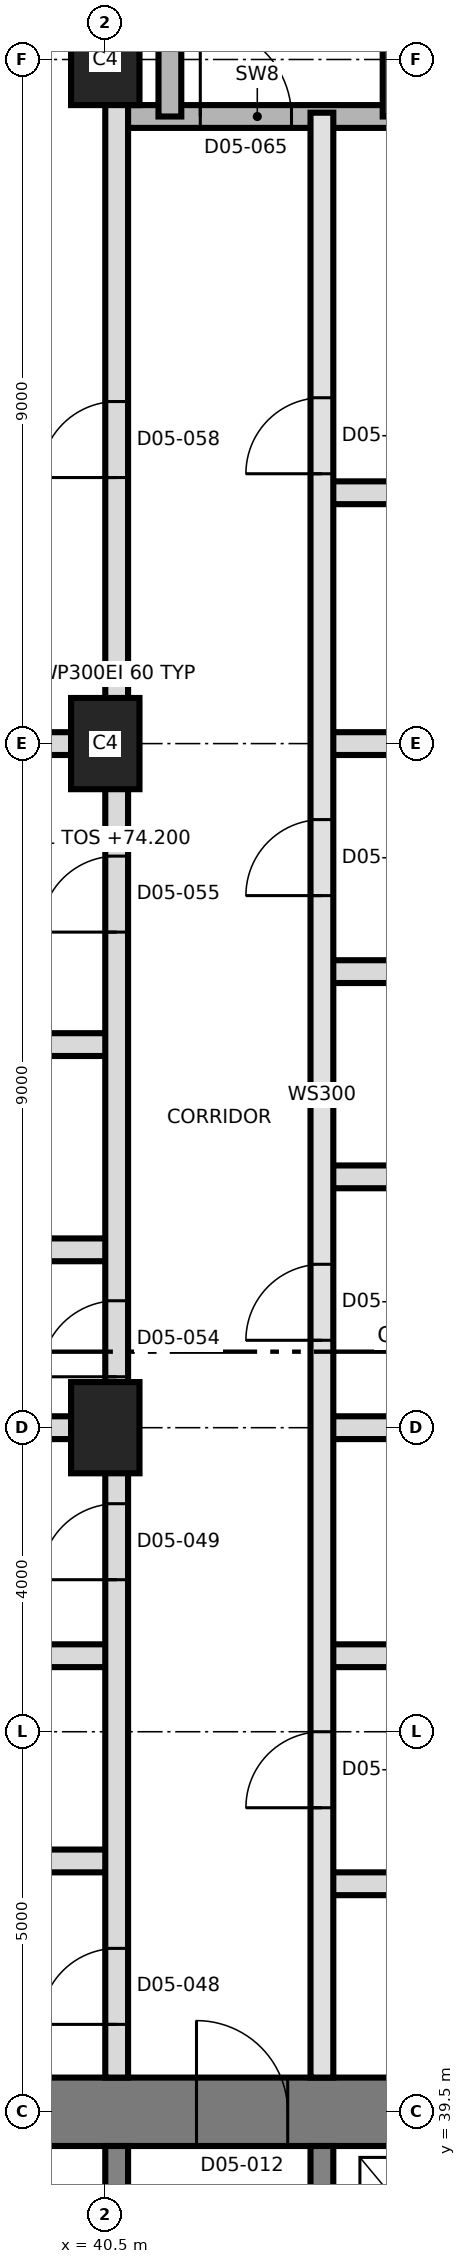
"""IFC4 building model, lengths in metres.
Left out: names, types, materials, properties, quantities, classifications, styles, units other than length and angle.
Written with IfcOpenShell. Run it as: python <this file> out.ifc"""

import sys

from ifc_helpers import new_model, si_unit, direction, frame, frame_2d, origin, origin_2d, place, context, subcontext, project, spatial, rectangle, extrude, element, fill, save


model = new_model("IFC4")
c1 = context("Model", 3, precision=1e-05, world=origin(), true_north=direction((0.0, 1.0)))
c2 = subcontext(c1, "Body", "Model", "MODEL_VIEW")
j1 = project(units=[si_unit("LENGTHUNIT", "METRE"), si_unit("PLANEANGLEUNIT", "RADIAN")], contexts=[c1])
p1 = place(None, origin())
s1 = spatial("IfcSite", under=j1, at=p1, CompositionType="ELEMENT")
p2 = place(p1, origin())
s2 = spatial("IfcBuilding", under=s1, at=p2, CompositionType="ELEMENT")
p3 = place(p2, frame((0.0, 0.0, 74.2)))
s3 = spatial("IfcBuildingStorey", under=s2, at=p3, CompositionType="ELEMENT", Elevation=74.2)
p4 = place(p3, frame((31.05, 39.5, 0.0), z_axis=(0.0, 0.0, 1.0), x_axis=(1.0, 0.0, 0.0)))
e1 = element("IfcWall", 1, at=p4, inside=s3, PredefinedType="SHEAR", context=c2, shape_type="SweptSolid", body=[
    extrude(rectangle(XDim=27.0, YDim=0.9, at=frame_2d((13.5, 0.0))), origin(), (0.0, 0.0, 1.0), 3.7),
])
p5 = place(p4, frame((10.65, 0.0, 0.0)))
e2 = element("IfcOpeningElement", 2, at=p5, cuts=e1, PredefinedType="OPENING", context=c2, shape_type="SweptSolid", body=[
    extrude(rectangle(XDim=1.2, YDim=2.1, at=frame_2d((0.6, 1.05))), frame((0.0, 0.46, 0.0), z_axis=(0.0, -1.0, 0.0), x_axis=(1.0, 0.0, 0.0)), (0.0, 0.0, 1.0), 0.92),
])
for number, where, z_axis, x_axis in (
    (3, (40.65, 33.5, 0.0), (0.0, 0.0, 1.0), (0.0, 1.0, 0.0)),
    (4, (43.35, 33.5, 0.0), (0.0, 0.0, 1.0), (0.0, 1.0, 0.0)),
):
    element("IfcWall", number, at=place(p3, frame(where, z_axis=z_axis, x_axis=x_axis)), inside=s3, PredefinedType="SHEAR", context=c2, shape_type="SweptSolid", body=[
        extrude(rectangle(XDim=5.55, YDim=0.3, at=frame_2d((2.775, 0.0))), origin(), (0.0, 0.0, 1.0), 3.7),
    ])
for number, where, z_axis, x_axis in (
    (5, (40.5, 48.5, 0.0), (0.0, 0.0, 1.0), (0.0, 1.0, 0.0)),
    (6, (40.5, 57.5, 0.0), (0.0, 0.0, 1.0), (0.0, 1.0, 0.0)),
    (7, (40.5, 66.5, 0.0), (0.0, 0.0, 1.0), (0.0, 1.0, 0.0)),
):
    element("IfcColumn", number, at=place(p3, frame(where, z_axis=z_axis, x_axis=x_axis)), inside=s3, PredefinedType="COLUMN", context=c2, shape_type="SweptSolid", body=[
        extrude(rectangle(XDim=1.2, YDim=0.9, at=origin_2d()), origin(), (0.0, 0.0, 1.0), 3.7),
    ])
p6 = place(p3, frame((43.35, 42.5, 0.0), z_axis=(0.0, 0.0, 1.0), x_axis=(1.0, 0.0, 0.0)))
e8 = element("IfcWall", 8, at=p6, inside=s3, PredefinedType="PARTITIONING", context=c2, shape_type="SweptSolid", body=[
    extrude(rectangle(XDim=3.3, YDim=0.3, at=frame_2d((1.65, 0.0))), origin(), (0.0, 0.0, 1.0), 3.4),
])
p7 = place(p3, frame((37.45, 42.8, 0.0), z_axis=(0.0, 0.0, 1.0), x_axis=(1.0, 0.0, 0.0)))
e9 = element("IfcWall", 9, at=p7, inside=s3, PredefinedType="PARTITIONING", context=c2, shape_type="SweptSolid", body=[
    extrude(rectangle(XDim=3.2, YDim=0.3, at=frame_2d((1.6, 0.0))), origin(), (0.0, 0.0, 1.0), 3.4),
])
p8 = place(p3, frame((30.35, 45.5, 0.0), z_axis=(0.0, 0.0, 1.0), x_axis=(1.0, 0.0, 0.0)))
e10 = element("IfcWall", 10, at=p8, inside=s3, PredefinedType="PARTITIONING", context=c2, shape_type="SweptSolid", body=[
    extrude(rectangle(XDim=10.3, YDim=0.3, at=frame_2d((5.15, 0.0))), origin(), (0.0, 0.0, 1.0), 3.4),
])
p9 = place(p3, frame((43.35, 45.5, 0.0), z_axis=(0.0, 0.0, 1.0), x_axis=(1.0, 0.0, 0.0)))
e11 = element("IfcWall", 11, at=p9, inside=s3, PredefinedType="PARTITIONING", context=c2, shape_type="SweptSolid", body=[
    extrude(rectangle(XDim=3.3, YDim=0.3, at=frame_2d((1.65, 0.0))), origin(), (0.0, 0.0, 1.0), 3.4),
])
p10 = place(p3, frame((30.35, 48.5, 0.0), z_axis=(0.0, 0.0, 1.0), x_axis=(1.0, 0.0, 0.0)))
e12 = element("IfcWall", 12, at=p10, inside=s3, PredefinedType="PARTITIONING", context=c2, shape_type="SweptSolid", body=[
    extrude(rectangle(XDim=10.3, YDim=0.3, at=frame_2d((5.15, 0.0))), origin(), (0.0, 0.0, 1.0), 3.4),
])
p11 = place(p3, frame((43.35, 48.5, 0.0), z_axis=(0.0, 0.0, 1.0), x_axis=(1.0, 0.0, 0.0)))
e13 = element("IfcWall", 13, at=p11, inside=s3, PredefinedType="PARTITIONING", context=c2, shape_type="SweptSolid", body=[
    extrude(rectangle(XDim=7.48, YDim=0.3, at=frame_2d((3.74, 0.0))), origin(), (0.0, 0.0, 1.0), 3.4),
])
for number, where, z_axis, x_axis in (
    (14, (37.45, 50.84, 0.0), (0.0, 0.0, 1.0), (1.0, 0.0, 0.0)),
    (15, (43.35, 51.8, 0.0), (0.0, 0.0, 1.0), (1.0, 0.0, 0.0)),
):
    element("IfcWall", number, at=place(p3, frame(where, z_axis=z_axis, x_axis=x_axis)), inside=s3, PredefinedType="PARTITIONING", context=c2, shape_type="SweptSolid", body=[
        extrude(rectangle(XDim=3.2, YDim=0.3, at=frame_2d((1.6, 0.0))), origin(), (0.0, 0.0, 1.0), 3.4),
    ])
p12 = place(p3, frame((30.35, 53.54, 0.0), z_axis=(0.0, 0.0, 1.0), x_axis=(1.0, 0.0, 0.0)))
e16 = element("IfcWall", 16, at=p12, inside=s3, PredefinedType="PARTITIONING", context=c2, shape_type="SweptSolid", body=[
    extrude(rectangle(XDim=10.3, YDim=0.3, at=frame_2d((5.15, 0.0))), origin(), (0.0, 0.0, 1.0), 3.4),
])
p13 = place(p3, frame((43.35, 54.5, 0.0), z_axis=(0.0, 0.0, 1.0), x_axis=(1.0, 0.0, 0.0)))
e17 = element("IfcWall", 17, at=p13, inside=s3, PredefinedType="PARTITIONING", context=c2, shape_type="SweptSolid", body=[
    extrude(rectangle(XDim=7.48, YDim=0.3, at=frame_2d((3.74, 0.0))), origin(), (0.0, 0.0, 1.0), 3.4),
])
p14 = place(p3, frame((30.35, 57.5, 0.0), z_axis=(0.0, 0.0, 1.0), x_axis=(1.0, 0.0, 0.0)))
e18 = element("IfcWall", 18, at=p14, inside=s3, PredefinedType="PARTITIONING", context=c2, shape_type="SweptSolid", body=[
    extrude(rectangle(XDim=10.3, YDim=0.3, at=frame_2d((5.15, 0.0))), origin(), (0.0, 0.0, 1.0), 3.4),
])
p15 = place(p3, frame((43.35, 57.5, 0.0), z_axis=(0.0, 0.0, 1.0), x_axis=(1.0, 0.0, 0.0)))
e19 = element("IfcWall", 19, at=p15, inside=s3, PredefinedType="PARTITIONING", context=c2, shape_type="SweptSolid", body=[
    extrude(rectangle(XDim=7.48, YDim=0.3, at=frame_2d((3.74, 0.0))), origin(), (0.0, 0.0, 1.0), 3.4),
])
p16 = place(p3, frame((43.35, 60.8, 0.0), z_axis=(0.0, 0.0, 1.0), x_axis=(1.0, 0.0, 0.0)))
e20 = element("IfcWall", 20, at=p16, inside=s3, PredefinedType="PARTITIONING", context=c2, shape_type="SweptSolid", body=[
    extrude(rectangle(XDim=3.5, YDim=0.3, at=frame_2d((1.75, 0.0))), origin(), (0.0, 0.0, 1.0), 3.4),
])
p17 = place(p3, frame((40.65, 65.75, 0.0), z_axis=(0.0, 0.0, 1.0), x_axis=(1.0, 0.0, 0.0)))
e21 = element("IfcWall", 21, at=p17, inside=s3, PredefinedType="SHEAR", context=c2, shape_type="SweptSolid", body=[
    extrude(rectangle(XDim=3.7, YDim=0.3, at=frame_2d((1.85, 0.0))), origin(), (0.0, 0.0, 1.0), 3.4),
])
p18 = place(p17, frame((1.1, 0.0, 0.0)))
e22 = element("IfcOpeningElement", 22, at=p18, cuts=e21, PredefinedType="OPENING", context=c2, shape_type="SweptSolid", body=[
    extrude(rectangle(XDim=1.2, YDim=2.1, at=frame_2d((0.6, 1.05))), frame((0.0, 0.16, 0.0), z_axis=(0.0, -1.0, 0.0), x_axis=(1.0, 0.0, 0.0)), (0.0, 0.0, 1.0), 0.32),
])
p19 = place(p3, frame((40.65, 39.95, 0.0), z_axis=(0.0, 0.0, 1.0), x_axis=(0.0, 1.0, 0.0)))
e23 = element("IfcWall", 23, at=p19, inside=s3, PredefinedType="PARTITIONING", context=c2, shape_type="SweptSolid", body=[
    extrude(rectangle(XDim=36.94, YDim=0.3, at=frame_2d((18.47, 0.0))), origin(), (0.0, 0.0, 1.0), 3.4),
])
p20 = place(p19, frame((0.7, 0.0, 0.0)))
e24 = element("IfcOpeningElement", 24, at=p20, cuts=e23, PredefinedType="OPENING", context=c2, shape_type="SweptSolid", body=[
    extrude(rectangle(XDim=1.0, YDim=2.1, at=frame_2d((0.5, 1.05))), frame((0.0, 0.16, 0.0), z_axis=(0.0, -1.0, 0.0), x_axis=(1.0, 0.0, 0.0)), (0.0, 0.0, 1.0), 0.32),
])
p21 = place(p19, frame((6.55, 0.0, 0.0)))
e25 = element("IfcOpeningElement", 25, at=p21, cuts=e23, PredefinedType="OPENING", context=c2, shape_type="SweptSolid", body=[
    extrude(rectangle(XDim=1.0, YDim=2.1, at=frame_2d((0.5, 1.05))), frame((0.0, 0.16, 0.0), z_axis=(0.0, -1.0, 0.0), x_axis=(1.0, 0.0, 0.0)), (0.0, 0.0, 1.0), 0.32),
])
p22 = place(p19, frame((9.22, 0.0, 0.0)))
e26 = element("IfcOpeningElement", 26, at=p22, cuts=e23, PredefinedType="OPENING", context=c2, shape_type="SweptSolid", body=[
    extrude(rectangle(XDim=1.0, YDim=2.1, at=frame_2d((0.5, 1.05))), frame((0.0, 0.16, 0.0), z_axis=(0.0, -1.0, 0.0), x_axis=(1.0, 0.0, 0.0)), (0.0, 0.0, 1.0), 0.32),
])
p23 = place(p19, frame((15.07, 0.0, 0.0)))
e27 = element("IfcOpeningElement", 27, at=p23, cuts=e23, PredefinedType="OPENING", context=c2, shape_type="SweptSolid", body=[
    extrude(rectangle(XDim=1.0, YDim=2.1, at=frame_2d((0.5, 1.05))), frame((0.0, 0.16, 0.0), z_axis=(0.0, -1.0, 0.0), x_axis=(1.0, 0.0, 0.0)), (0.0, 0.0, 1.0), 0.32),
])
p24 = place(p19, frame((21.05, 0.0, 0.0)))
e28 = element("IfcOpeningElement", 28, at=p24, cuts=e23, PredefinedType="OPENING", context=c2, shape_type="SweptSolid", body=[
    extrude(rectangle(XDim=1.0, YDim=2.4, at=frame_2d((0.5, 1.2))), frame((0.0, 0.16, 0.0), z_axis=(0.0, -1.0, 0.0), x_axis=(1.0, 0.0, 0.0)), (0.0, 0.0, 1.0), 0.32),
])
p25 = place(p3, frame((41.35, 65.75, 0.0), z_axis=(0.0, 0.0, 1.0), x_axis=(0.0, 1.0, 0.0)))
e29 = element("IfcWall", 29, at=p25, inside=s3, PredefinedType="SHEAR", context=c2, shape_type="SweptSolid", body=[
    extrude(rectangle(XDim=8.85, YDim=0.3, at=frame_2d((4.425, 0.0))), origin(), (0.0, 0.0, 1.0), 3.4),
])
p26 = place(p3, frame((43.35, 39.95, 0.0), z_axis=(0.0, 0.0, 1.0), x_axis=(0.0, 1.0, 0.0)))
e30 = element("IfcWall", 30, at=p26, inside=s3, PredefinedType="SOLIDWALL", context=c2, shape_type="SweptSolid", body=[
    extrude(rectangle(XDim=25.85, YDim=0.3, at=frame_2d((12.925, 0.0))), origin(), (0.0, 0.0, 1.0), 3.4),
])
p27 = place(p26, frame((3.55, 0.0, 0.0)))
e31 = element("IfcOpeningElement", 31, at=p27, cuts=e30, PredefinedType="OPENING", context=c2, shape_type="SweptSolid", body=[
    extrude(rectangle(XDim=1.0, YDim=2.4, at=frame_2d((0.5, 1.2))), frame((0.0, 0.16, 0.0), z_axis=(0.0, -1.0, 0.0), x_axis=(1.0, 0.0, 0.0)), (0.0, 0.0, 1.0), 0.32),
])
p28 = place(p26, frame((9.7, 0.0, 0.0)))
e32 = element("IfcOpeningElement", 32, at=p28, cuts=e30, PredefinedType="OPENING", context=c2, shape_type="SweptSolid", body=[
    extrude(rectangle(XDim=1.0, YDim=2.1, at=frame_2d((0.5, 1.05))), frame((0.0, 0.16, 0.0), z_axis=(0.0, -1.0, 0.0), x_axis=(1.0, 0.0, 0.0)), (0.0, 0.0, 1.0), 0.32),
])
p29 = place(p26, frame((15.55, 0.0, 0.0)))
e33 = element("IfcOpeningElement", 33, at=p29, cuts=e30, PredefinedType="OPENING", context=c2, shape_type="SweptSolid", body=[
    extrude(rectangle(XDim=1.0, YDim=2.1, at=frame_2d((0.5, 1.05))), frame((0.0, 0.16, 0.0), z_axis=(0.0, -1.0, 0.0), x_axis=(1.0, 0.0, 0.0)), (0.0, 0.0, 1.0), 0.32),
])
p30 = place(p26, frame((21.1, 0.0, 0.0)))
e34 = element("IfcOpeningElement", 34, at=p30, cuts=e30, PredefinedType="OPENING", context=c2, shape_type="SweptSolid", body=[
    extrude(rectangle(XDim=1.0, YDim=2.4, at=frame_2d((0.5, 1.2))), frame((0.0, 0.16, 0.0), z_axis=(0.0, -1.0, 0.0), x_axis=(1.0, 0.0, 0.0)), (0.0, 0.0, 1.0), 0.32),
])
p31 = place(p3, frame((44.3, 65.75, 0.0), z_axis=(0.0, 0.0, 1.0), x_axis=(0.0, 1.0, 0.0)))
e35 = element("IfcWall", 35, at=p31, inside=s3, PredefinedType="SHEAR", context=c2, shape_type="SweptSolid", body=[
    extrude(rectangle(XDim=8.85, YDim=0.3, at=frame_2d((4.425, 0.0))), origin(), (0.0, 0.0, 1.0), 3.4),
])
p32 = place(p5, origin())
e36 = element("IfcDoor", 36, at=p32, inside=s3, OperationType="SINGLE_SWING_RIGHT", PredefinedType="DOOR", context=c2, shape_type="SweptSolid", body=[
    extrude(rectangle(XDim=1.2, YDim=2.1, at=frame_2d((0.6, 1.05))), frame((0.0, 0.025, 0.0), z_axis=(0.0, -1.0, 0.0), x_axis=(1.0, 0.0, 0.0)), (0.0, 0.0, 1.0), 0.05),
])
fill(e2, e36)
p33 = place(p27, origin())
e37 = element("IfcDoor", 37, at=p33, inside=s3, OperationType="SINGLE_SWING_LEFT", PredefinedType="DOOR", context=c2, shape_type="SweptSolid", body=[
    extrude(rectangle(XDim=1.0, YDim=2.4, at=frame_2d((0.5, 1.2))), frame((0.0, 0.025, 0.0), z_axis=(0.0, -1.0, 0.0), x_axis=(1.0, 0.0, 0.0)), (0.0, 0.0, 1.0), 0.05),
])
fill(e31, e37)
p34 = place(p20, origin())
e38 = element("IfcDoor", 38, at=p34, inside=s3, OperationType="SINGLE_SWING_LEFT", PredefinedType="DOOR", context=c2, shape_type="SweptSolid", body=[
    extrude(rectangle(XDim=1.0, YDim=2.1, at=frame_2d((0.5, 1.05))), frame((0.0, 0.025, 0.0), z_axis=(0.0, -1.0, 0.0), x_axis=(1.0, 0.0, 0.0)), (0.0, 0.0, 1.0), 0.05),
])
fill(e24, e38)
p35 = place(p21, origin())
e39 = element("IfcDoor", 39, at=p35, inside=s3, OperationType="SINGLE_SWING_RIGHT", PredefinedType="DOOR", context=c2, shape_type="SweptSolid", body=[
    extrude(rectangle(XDim=1.0, YDim=2.1, at=frame_2d((0.5, 1.05))), frame((0.0, 0.025, 0.0), z_axis=(0.0, -1.0, 0.0), x_axis=(1.0, 0.0, 0.0)), (0.0, 0.0, 1.0), 0.05),
])
fill(e25, e39)
p36 = place(p28, origin())
e40 = element("IfcDoor", 40, at=p36, inside=s3, OperationType="SINGLE_SWING_LEFT", PredefinedType="DOOR", context=c2, shape_type="SweptSolid", body=[
    extrude(rectangle(XDim=1.0, YDim=2.1, at=frame_2d((0.5, 1.05))), frame((0.0, 0.025, 0.0), z_axis=(0.0, -1.0, 0.0), x_axis=(1.0, 0.0, 0.0)), (0.0, 0.0, 1.0), 0.05),
])
fill(e32, e40)
p37 = place(p29, origin())
e41 = element("IfcDoor", 41, at=p37, inside=s3, OperationType="SINGLE_SWING_RIGHT", PredefinedType="DOOR", context=c2, shape_type="SweptSolid", body=[
    extrude(rectangle(XDim=1.0, YDim=2.1, at=frame_2d((0.5, 1.05))), frame((0.0, 0.025, 0.0), z_axis=(0.0, -1.0, 0.0), x_axis=(1.0, 0.0, 0.0)), (0.0, 0.0, 1.0), 0.05),
])
fill(e33, e41)
p38 = place(p22, origin())
e42 = element("IfcDoor", 42, at=p38, inside=s3, OperationType="SINGLE_SWING_LEFT", PredefinedType="DOOR", context=c2, shape_type="SweptSolid", body=[
    extrude(rectangle(XDim=1.0, YDim=2.1, at=frame_2d((0.5, 1.05))), frame((0.0, 0.025, 0.0), z_axis=(0.0, -1.0, 0.0), x_axis=(1.0, 0.0, 0.0)), (0.0, 0.0, 1.0), 0.05),
])
fill(e26, e42)
p39 = place(p23, origin())
e43 = element("IfcDoor", 43, at=p39, inside=s3, OperationType="SINGLE_SWING_RIGHT", PredefinedType="DOOR", context=c2, shape_type="SweptSolid", body=[
    extrude(rectangle(XDim=1.0, YDim=2.1, at=frame_2d((0.5, 1.05))), frame((0.0, 0.025, 0.0), z_axis=(0.0, -1.0, 0.0), x_axis=(1.0, 0.0, 0.0)), (0.0, 0.0, 1.0), 0.05),
])
fill(e27, e43)
p40 = place(p30, origin())
e44 = element("IfcDoor", 44, at=p40, inside=s3, OperationType="SINGLE_SWING_LEFT", PredefinedType="DOOR", context=c2, shape_type="SweptSolid", body=[
    extrude(rectangle(XDim=1.0, YDim=2.4, at=frame_2d((0.5, 1.2))), frame((0.0, 0.025, 0.0), z_axis=(0.0, -1.0, 0.0), x_axis=(1.0, 0.0, 0.0)), (0.0, 0.0, 1.0), 0.05),
])
fill(e34, e44)
p41 = place(p24, origin())
e45 = element("IfcDoor", 45, at=p41, inside=s3, OperationType="SINGLE_SWING_RIGHT", PredefinedType="DOOR", context=c2, shape_type="SweptSolid", body=[
    extrude(rectangle(XDim=1.0, YDim=2.4, at=frame_2d((0.5, 1.2))), frame((0.0, 0.025, 0.0), z_axis=(0.0, -1.0, 0.0), x_axis=(1.0, 0.0, 0.0)), (0.0, 0.0, 1.0), 0.05),
])
fill(e28, e45)
p42 = place(p18, origin())
e46 = element("IfcDoor", 46, at=p42, inside=s3, OperationType="SINGLE_SWING_RIGHT", PredefinedType="DOOR", context=c2, shape_type="SweptSolid", body=[
    extrude(rectangle(XDim=1.2, YDim=2.1, at=frame_2d((0.6, 1.05))), frame((0.0, 0.025, 0.0), z_axis=(0.0, -1.0, 0.0), x_axis=(1.0, 0.0, 0.0)), (0.0, 0.0, 1.0), 0.05),
])
fill(e22, e46)
save(model, sys.argv[1])
